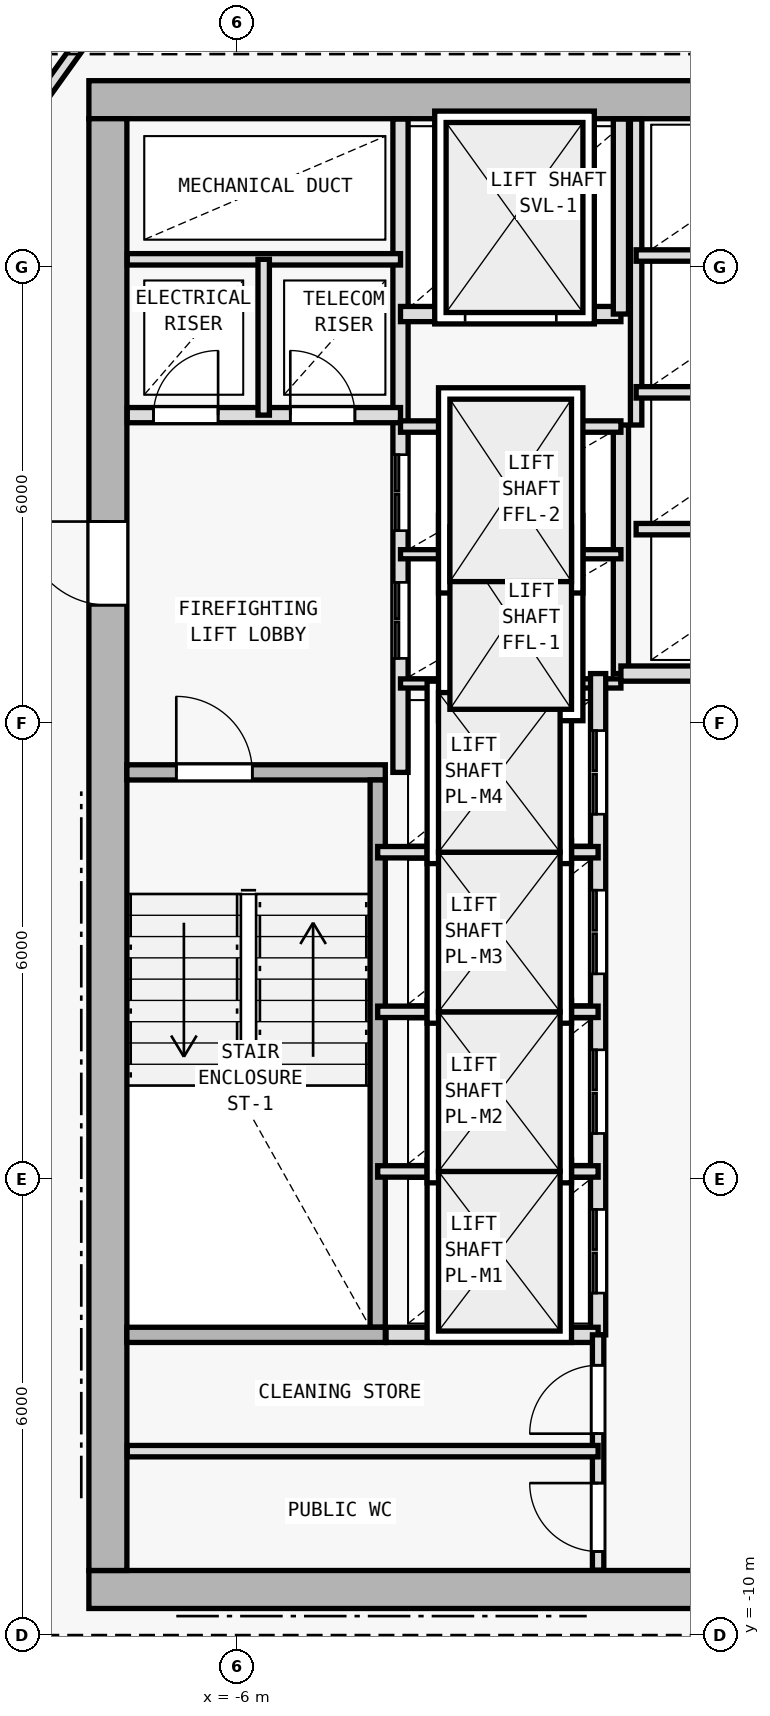
"""IFC4 building model, lengths in metres.
Left out: names, types, materials, properties, quantities, classifications, styles, units other than length and angle.
Written with IfcOpenShell. Run it as: python <this file> out.ifc"""

import sys

from ifc_helpers import new_model, si_unit, direction, frame, frame_2d, origin, origin_2d, place, context, subcontext, project, spatial, rectangle, i_section, extrude, element, fill, save


model = new_model("IFC4")
c1 = context("Model", 3, precision=1e-05, world=origin(), true_north=direction((0.0, 1.0)))
c2 = subcontext(c1, "Body", "Model", "MODEL_VIEW")
j1 = project(units=[si_unit("LENGTHUNIT", "METRE"), si_unit("PLANEANGLEUNIT", "RADIAN")], contexts=[c1])
p1 = place(None, origin())
s1 = spatial("IfcSite", under=j1, at=p1, CompositionType="ELEMENT")
p2 = place(p1, origin())
s2 = spatial("IfcBuilding", under=s1, at=p2, CompositionType="ELEMENT")
p3 = place(p2, frame((0.0, 0.0, 167.4)))
s3 = spatial("IfcBuildingStorey", under=s2, at=p3, CompositionType="ELEMENT", Elevation=167.4)
for number, where, z_axis, x_axis in (
    (1, (-7.7, -9.4, 0.0), (0.0, 0.0, 1.0), (1.0, 0.0, 0.0)),
    (2, (-7.7, 10.2, 0.0), (0.0, 0.0, 1.0), (1.0, 0.0, 0.0)),
    (3, (0.0, -9.4, 0.0), (0.0, 0.0, 1.0), (1.0, 0.0, 0.0)),
    (4, (-7.7, 2.0, 0.0), (0.0, 0.0, 1.0), (1.0, 0.0, 0.0)),
):
    element("IfcColumn", number, at=place(p3, frame(where, z_axis=z_axis, x_axis=x_axis)), inside=s3, PredefinedType="COLUMN", context=c2, shape_type="SweptSolid", body=[
        extrude(i_section(OverallWidth=0.404, OverallDepth=0.407, WebThickness=0.017, FlangeThickness=0.028, FilletRadius=0.015, at=origin_2d()), origin(), (0.0, 0.0, 1.0), 3.6),
    ])
p4 = place(p3, frame((-7.95, -9.4, 0.0), z_axis=(0.0, 0.0, 1.0), x_axis=(1.0, 0.0, 0.0)))
e5 = element("IfcWall", 5, at=p4, inside=s3, PredefinedType="SHEAR", context=c2, shape_type="SweptSolid", body=[
    extrude(rectangle(XDim=15.9, YDim=0.5, at=frame_2d((7.95, 0.0))), origin(), (0.0, 0.0, 1.0), 3.35),
])
p5 = place(p4, frame((9.6, 0.0, 0.0)))
e6 = element("IfcOpeningElement", 6, at=p5, cuts=e5, PredefinedType="OPENING", context=c2, shape_type="SweptSolid", body=[
    extrude(rectangle(XDim=1.5, YDim=2.2, at=frame_2d((0.75, 1.1))), frame((0.0, 0.26, 0.0), z_axis=(0.0, -1.0, 0.0), x_axis=(1.0, 0.0, 0.0)), (0.0, 0.0, 1.0), 0.52),
])
p6 = place(p3, frame((7.95, 10.2, 0.0), z_axis=(0.0, 0.0, 1.0), x_axis=(-1.0, 0.0, 0.0)))
e7 = element("IfcWall", 7, at=p6, inside=s3, PredefinedType="SHEAR", context=c2, shape_type="SweptSolid", body=[
    extrude(rectangle(XDim=15.9, YDim=0.5, at=frame_2d((7.95, 0.0))), origin(), (0.0, 0.0, 1.0), 3.35),
])
p7 = place(p6, frame((4.4, 0.0, 0.0)))
e8 = element("IfcOpeningElement", 8, at=p7, cuts=e7, PredefinedType="OPENING", context=c2, shape_type="SweptSolid", body=[
    extrude(rectangle(XDim=1.1, YDim=2.15, at=frame_2d((0.55, 1.075))), frame((0.0, 0.26, 0.0), z_axis=(0.0, -1.0, 0.0), x_axis=(1.0, 0.0, 0.0)), (0.0, 0.0, 1.0), 0.52),
])
p8 = place(p3, frame((-7.7, -9.15, 0.0), z_axis=(0.0, 0.0, 1.0), x_axis=(0.0, 1.0, 0.0)))
e9 = element("IfcWall", 9, at=p8, inside=s3, PredefinedType="SHEAR", context=c2, shape_type="SweptSolid", body=[
    extrude(rectangle(XDim=19.1, YDim=0.5, at=frame_2d((9.55, 0.0))), origin(), (0.0, 0.0, 1.0), 3.35),
])
p9 = place(p8, frame((12.7, 0.0, 0.0)))
e10 = element("IfcOpeningElement", 10, at=p9, cuts=e9, PredefinedType="OPENING", context=c2, shape_type="SweptSolid", body=[
    extrude(rectangle(XDim=1.1, YDim=2.15, at=frame_2d((0.55, 1.075))), frame((0.0, 0.26, 0.0), z_axis=(0.0, -1.0, 0.0), x_axis=(1.0, 0.0, 0.0)), (0.0, 0.0, 1.0), 0.52),
])
p10 = place(p3, frame((-7.45, 1.35, 0.0), z_axis=(0.0, 0.0, 1.0), x_axis=(1.0, 0.0, 0.0)))
e11 = element("IfcWall", 11, at=p10, inside=s3, PredefinedType="SOLIDWALL", context=c2, shape_type="SweptSolid", body=[
    extrude(rectangle(XDim=3.4, YDim=0.2, at=frame_2d((1.7, 0.0))), origin(), (0.0, 0.0, 1.0), 3.35),
])
p11 = place(p10, frame((0.65, 0.0, 0.0)))
e12 = element("IfcOpeningElement", 12, at=p11, cuts=e11, PredefinedType="OPENING", context=c2, shape_type="SweptSolid", body=[
    extrude(rectangle(XDim=1.0, YDim=2.15, at=frame_2d((0.5, 1.075))), frame((0.0, 0.11, 0.0), z_axis=(0.0, -1.0, 0.0), x_axis=(1.0, 0.0, 0.0)), (0.0, 0.0, 1.0), 0.22),
])
p12 = place(p3, frame((-4.15, -5.95, 0.0), z_axis=(0.0, 0.0, 1.0), x_axis=(0.0, 1.0, 0.0)))
e13 = element("IfcWall", 13, at=p12, inside=s3, PredefinedType="SOLIDWALL", context=c2, shape_type="SweptSolid", body=[
    extrude(rectangle(XDim=7.2, YDim=0.2, at=frame_2d((3.6, 0.0))), origin(), (0.0, 0.0, 1.0), 3.35),
])
p13 = place(p3, frame((-3.85, 1.35, 0.0), z_axis=(0.0, 0.0, 1.0), x_axis=(0.0, 1.0, 0.0)))
e14 = element("IfcWall", 14, at=p13, inside=s3, PredefinedType="SOLIDWALL", context=c2, shape_type="SweptSolid", body=[
    extrude(rectangle(XDim=8.595, YDim=0.2, at=frame_2d((4.297, 0.0))), origin(), (0.0, 0.0, 1.0), 3.35),
])
p14 = place(p13, frame((1.5, 0.0, 0.0)))
e15 = element("IfcOpeningElement", 15, at=p14, cuts=e14, PredefinedType="OPENING", context=c2, shape_type="SweptSolid", body=[
    extrude(rectangle(XDim=1.0, YDim=2.15, at=frame_2d((0.5, 1.075))), frame((0.0, 0.11, 0.0), z_axis=(0.0, -1.0, 0.0), x_axis=(1.0, 0.0, 0.0)), (0.0, 0.0, 1.0), 0.22),
])
p15 = place(p13, frame((3.18, 0.0, 0.0)))
e16 = element("IfcOpeningElement", 16, at=p15, cuts=e14, PredefinedType="OPENING", context=c2, shape_type="SweptSolid", body=[
    extrude(rectangle(XDim=1.0, YDim=2.15, at=frame_2d((0.5, 1.075))), frame((0.0, 0.11, 0.0), z_axis=(0.0, -1.0, 0.0), x_axis=(1.0, 0.0, 0.0)), (0.0, 0.0, 1.0), 0.22),
])
p16 = place(p3, frame((-7.445, 6.05, 0.0), z_axis=(0.0, 0.0, 1.0), x_axis=(1.0, 0.0, 0.0)))
e17 = element("IfcWall", 17, at=p16, inside=s3, PredefinedType="SOLIDWALL", context=c2, shape_type="SweptSolid", body=[
    extrude(rectangle(XDim=3.595, YDim=0.2, at=frame_2d((1.797, 0.0))), origin(), (0.0, 0.0, 1.0), 3.35),
])
p17 = place(p16, frame((0.345, 0.0, 0.0)))
e18 = element("IfcOpeningElement", 18, at=p17, cuts=e17, PredefinedType="OPENING", context=c2, shape_type="SweptSolid", body=[
    extrude(rectangle(XDim=0.85, YDim=2.1, at=frame_2d((0.425, 1.05))), frame((0.0, 0.11, 0.0), z_axis=(0.0, -1.0, 0.0), x_axis=(1.0, 0.0, 0.0)), (0.0, 0.0, 1.0), 0.22),
])
p18 = place(p16, frame((2.145, 0.0, 0.0)))
e19 = element("IfcOpeningElement", 19, at=p18, cuts=e17, PredefinedType="OPENING", context=c2, shape_type="SweptSolid", body=[
    extrude(rectangle(XDim=0.85, YDim=2.1, at=frame_2d((0.425, 1.05))), frame((0.0, 0.11, 0.0), z_axis=(0.0, -1.0, 0.0), x_axis=(1.0, 0.0, 0.0)), (0.0, 0.0, 1.0), 0.22),
])
p19 = place(p3, frame((-7.445, 8.1, 0.0), z_axis=(0.0, 0.0, 1.0), x_axis=(1.0, 0.0, 0.0)))
e20 = element("IfcWall", 20, at=p19, inside=s3, PredefinedType="PARTITIONING", context=c2, shape_type="SweptSolid", body=[
    extrude(rectangle(XDim=3.595, YDim=0.15, at=frame_2d((1.797, 0.0))), origin(), (0.0, 0.0, 1.0), 3.35),
])
p20 = place(p3, frame((-5.65, 6.05, 0.0), z_axis=(0.0, 0.0, 1.0), x_axis=(0.0, 1.0, 0.0)))
e21 = element("IfcWall", 21, at=p20, inside=s3, PredefinedType="PARTITIONING", context=c2, shape_type="SweptSolid", body=[
    extrude(rectangle(XDim=2.05, YDim=0.15, at=frame_2d((1.025, 0.0))), origin(), (0.0, 0.0, 1.0), 3.35),
])
p21 = place(p3, frame((-0.95, 2.65, 0.0), z_axis=(0.0, 0.0, 1.0), x_axis=(0.0, 1.0, 0.0)))
e22 = element("IfcWall", 22, at=p21, inside=s3, PredefinedType="SOLIDWALL", context=c2, shape_type="SweptSolid", body=[
    extrude(rectangle(XDim=3.27, YDim=0.2, at=frame_2d((1.635, 0.0))), origin(), (0.0, 0.0, 1.0), 3.35),
])
for number, where, z_axis, x_axis in (
    (23, (-3.85, 2.52, 0.0), (0.0, 0.0, 1.0), (1.0, 0.0, 0.0)),
    (24, (-3.85, 4.22, 0.0), (0.0, 0.0, 1.0), (1.0, 0.0, 0.0)),
):
    element("IfcWall", number, at=place(p3, frame(where, z_axis=z_axis, x_axis=x_axis)), inside=s3, PredefinedType="PARTITIONING", context=c2, shape_type="SweptSolid", body=[
        extrude(rectangle(XDim=2.9, YDim=0.12, at=frame_2d((1.45, 0.0))), origin(), (0.0, 0.0, 1.0), 3.35),
    ])
p22 = place(p3, frame((-3.85, 5.9, 0.0), z_axis=(0.0, 0.0, 1.0), x_axis=(1.0, 0.0, 0.0)))
e25 = element("IfcWall", 25, at=p22, inside=s3, PredefinedType="PARTITIONING", context=c2, shape_type="SweptSolid", body=[
    extrude(rectangle(XDim=2.9, YDim=0.15, at=frame_2d((1.45, 0.0))), origin(), (0.0, 0.0, 1.0), 3.35),
])
p23 = place(p3, frame((-3.85, 7.38, 0.0), z_axis=(0.0, 0.0, 1.0), x_axis=(1.0, 0.0, 0.0)))
e26 = element("IfcWall", 26, at=p23, inside=s3, PredefinedType="SOLIDWALL", context=c2, shape_type="SweptSolid", body=[
    extrude(rectangle(XDim=2.9, YDim=0.2, at=frame_2d((1.45, 0.0))), origin(), (0.0, 0.0, 1.0), 3.35),
])
p24 = place(p23, frame((0.85, 0.0, 0.0)))
e27 = element("IfcOpeningElement", 27, at=p24, cuts=e26, PredefinedType="OPENING", context=c2, shape_type="SweptSolid", body=[
    extrude(rectangle(XDim=1.2, YDim=2.2, at=frame_2d((0.6, 1.1))), frame((0.0, 0.11, 0.0), z_axis=(0.0, -1.0, 0.0), x_axis=(1.0, 0.0, 0.0)), (0.0, 0.0, 1.0), 0.22),
])
p25 = place(p3, frame((-0.95, 7.38, 0.0), z_axis=(0.0, 0.0, 1.0), x_axis=(0.0, 1.0, 0.0)))
e28 = element("IfcWall", 28, at=p25, inside=s3, PredefinedType="SOLIDWALL", context=c2, shape_type="SweptSolid", body=[
    extrude(rectangle(XDim=2.565, YDim=0.2, at=frame_2d((1.283, 0.0))), origin(), (0.0, 0.0, 1.0), 3.35),
])
p26 = place(p3, frame((-1.25, -6.05, 0.0), z_axis=(0.0, 0.0, 1.0), x_axis=(0.0, 1.0, 0.0)))
e29 = element("IfcWall", 29, at=p26, inside=s3, PredefinedType="SOLIDWALL", context=c2, shape_type="SweptSolid", body=[
    extrude(rectangle(XDim=8.7, YDim=0.2, at=frame_2d((4.35, 0.0))), origin(), (0.0, 0.0, 1.0), 3.35),
])
p27 = place(p26, frame((0.55, 0.0, 0.0)))
e30 = element("IfcOpeningElement", 30, at=p27, cuts=e29, PredefinedType="OPENING", context=c2, shape_type="SweptSolid", body=[
    extrude(rectangle(XDim=1.1, YDim=2.15, at=frame_2d((0.55, 1.075))), frame((0.0, 0.11, 0.0), z_axis=(0.0, -1.0, 0.0), x_axis=(1.0, 0.0, 0.0)), (0.0, 0.0, 1.0), 0.22),
])
p28 = place(p26, frame((2.65, 0.0, 0.0)))
e31 = element("IfcOpeningElement", 31, at=p28, cuts=e29, PredefinedType="OPENING", context=c2, shape_type="SweptSolid", body=[
    extrude(rectangle(XDim=1.1, YDim=2.15, at=frame_2d((0.55, 1.075))), frame((0.0, 0.11, 0.0), z_axis=(0.0, -1.0, 0.0), x_axis=(1.0, 0.0, 0.0)), (0.0, 0.0, 1.0), 0.22),
])
p29 = place(p26, frame((4.75, 0.0, 0.0)))
e32 = element("IfcOpeningElement", 32, at=p29, cuts=e29, PredefinedType="OPENING", context=c2, shape_type="SweptSolid", body=[
    extrude(rectangle(XDim=1.1, YDim=2.15, at=frame_2d((0.55, 1.075))), frame((0.0, 0.11, 0.0), z_axis=(0.0, -1.0, 0.0), x_axis=(1.0, 0.0, 0.0)), (0.0, 0.0, 1.0), 0.22),
])
p30 = place(p26, frame((6.85, 0.0, 0.0)))
e33 = element("IfcOpeningElement", 33, at=p30, cuts=e29, PredefinedType="OPENING", context=c2, shape_type="SweptSolid", body=[
    extrude(rectangle(XDim=1.1, YDim=2.15, at=frame_2d((0.55, 1.075))), frame((0.0, 0.11, 0.0), z_axis=(0.0, -1.0, 0.0), x_axis=(1.0, 0.0, 0.0)), (0.0, 0.0, 1.0), 0.22),
])
for number, where, z_axis, x_axis in (
    (34, (-4.15, -3.9, 0.0), (0.0, 0.0, 1.0), (1.0, 0.0, 0.0)),
    (35, (-4.15, -1.8, 0.0), (0.0, 0.0, 1.0), (1.0, 0.0, 0.0)),
    (36, (-4.15, 0.3, 0.0), (0.0, 0.0, 1.0), (1.0, 0.0, 0.0)),
):
    element("IfcWall", number, at=place(p3, frame(where, z_axis=z_axis, x_axis=x_axis)), inside=s3, PredefinedType="PARTITIONING", context=c2, shape_type="SweptSolid", body=[
        extrude(rectangle(XDim=2.9, YDim=0.15, at=frame_2d((1.45, 0.0))), origin(), (0.0, 0.0, 1.0), 3.35),
    ])
p31 = place(p3, frame((-0.95, 2.65, 0.0), z_axis=(0.0, 0.0, 1.0), x_axis=(1.0, 0.0, 0.0)))
e37 = element("IfcWall", 37, at=p31, inside=s3, PredefinedType="SOLIDWALL", context=c2, shape_type="SweptSolid", body=[
    extrude(rectangle(XDim=2.9, YDim=0.2, at=frame_2d((1.45, 0.0))), origin(), (0.0, 0.0, 1.0), 3.35),
])
p32 = place(p3, frame((-0.75, 5.92, 0.0), z_axis=(0.0, 0.0, 1.0), x_axis=(0.0, 1.0, 0.0)))
e38 = element("IfcWall", 38, at=p32, inside=s3, PredefinedType="PARTITIONING", context=c2, shape_type="SweptSolid", body=[
    extrude(rectangle(XDim=4.025, YDim=0.15, at=frame_2d((2.013, 0.0))), origin(), (0.0, 0.0, 1.0), 3.35),
])
for number, where, z_axis, x_axis in (
    (39, (-0.75, 4.55, 0.0), (0.0, 0.0, 1.0), (1.0, 0.0, 0.0)),
    (40, (-0.75, 6.35, 0.0), (0.0, 0.0, 1.0), (1.0, 0.0, 0.0)),
    (41, (-0.75, 8.15, 0.0), (0.0, 0.0, 1.0), (1.0, 0.0, 0.0)),
):
    element("IfcWall", number, at=place(p3, frame(where, z_axis=z_axis, x_axis=x_axis)), inside=s3, PredefinedType="PARTITIONING", context=c2, shape_type="SweptSolid", body=[
        extrude(rectangle(XDim=2.7, YDim=0.15, at=frame_2d((1.35, 0.0))), origin(), (0.0, 0.0, 1.0), 3.35),
    ])
p33 = place(p3, frame((-7.45, -6.05, 0.0), z_axis=(0.0, 0.0, 1.0), x_axis=(1.0, 0.0, 0.0)))
e42 = element("IfcWall", 42, at=p33, inside=s3, PredefinedType="SOLIDWALL", context=c2, shape_type="SweptSolid", body=[
    extrude(rectangle(XDim=3.4, YDim=0.2, at=frame_2d((1.7, 0.0))), origin(), (0.0, 0.0, 1.0), 3.35),
])
p34 = place(p3, frame((-4.04, -6.05, 0.0), z_axis=(0.0, 0.0, 1.0), x_axis=(1.0, 0.0, 0.0)))
e43 = element("IfcWall", 43, at=p34, inside=s3, PredefinedType="SOLIDWALL", context=c2, shape_type="SweptSolid", body=[
    extrude(rectangle(XDim=2.79, YDim=0.2, at=frame_2d((1.395, 0.0))), origin(), (0.0, 0.0, 1.0), 3.35),
])
p35 = place(p3, frame((-1.25, -9.145, 0.0), z_axis=(0.0, 0.0, 1.0), x_axis=(0.0, 1.0, 0.0)))
e44 = element("IfcWall", 44, at=p35, inside=s3, PredefinedType="PARTITIONING", context=c2, shape_type="SweptSolid", body=[
    extrude(rectangle(XDim=3.095, YDim=0.15, at=frame_2d((1.547, 0.0))), origin(), (0.0, 0.0, 1.0), 3.35),
])
p36 = place(p35, frame((1.795, 0.0, 0.0)))
e45 = element("IfcOpeningElement", 45, at=p36, cuts=e44, PredefinedType="OPENING", context=c2, shape_type="SweptSolid", body=[
    extrude(rectangle(XDim=0.9, YDim=2.1, at=frame_2d((0.45, 1.05))), frame((0.0, 0.085, 0.0), z_axis=(0.0, -1.0, 0.0), x_axis=(1.0, 0.0, 0.0)), (0.0, 0.0, 1.0), 0.17),
])
p37 = place(p35, frame((0.245, 0.0, 0.0)))
e46 = element("IfcOpeningElement", 46, at=p37, cuts=e44, PredefinedType="OPENING", context=c2, shape_type="SweptSolid", body=[
    extrude(rectangle(XDim=0.9, YDim=2.1, at=frame_2d((0.45, 1.05))), frame((0.0, 0.085, 0.0), z_axis=(0.0, -1.0, 0.0), x_axis=(1.0, 0.0, 0.0)), (0.0, 0.0, 1.0), 0.17),
])
p38 = place(p3, frame((-7.445, -7.58, 0.0), z_axis=(0.0, 0.0, 1.0), x_axis=(1.0, 0.0, 0.0)))
e47 = element("IfcWall", 47, at=p38, inside=s3, PredefinedType="PARTITIONING", context=c2, shape_type="SweptSolid", body=[
    extrude(rectangle(XDim=6.195, YDim=0.15, at=frame_2d((3.098, 0.0))), origin(), (0.0, 0.0, 1.0), 3.35),
])
p39 = place(p3, frame((-9.86, 8.426, 0.0), z_axis=(0.0, 0.0, 1.0), x_axis=(0.582449511476, 0.812866881218, 0.0)))
e48 = element("IfcWall", 48, at=p39, inside=s3, PredefinedType="PARTITIONING", context=c2, shape_type="SweptSolid", body=[
    extrude(rectangle(XDim=4.84, YDim=0.15, at=frame_2d((2.42, 0.0))), origin(), (0.0, 0.0, 1.0), 2.965),
])
p40 = place(p39, frame((3.055, 0.0, 0.0)))
e49 = element("IfcOpeningElement", 49, at=p40, cuts=e48, PredefinedType="OPENING", context=c2, shape_type="SweptSolid", body=[
    extrude(rectangle(XDim=0.9, YDim=2.1, at=frame_2d((0.45, 1.05))), frame((0.0, 0.085, 0.0), z_axis=(0.0, -1.0, 0.0), x_axis=(1.0, 0.0, 0.0)), (0.0, 0.0, 1.0), 0.17),
])
p41 = place(p9, origin())
e50 = element("IfcDoor", 50, at=p41, inside=s3, OperationType="SINGLE_SWING_RIGHT", PredefinedType="DOOR", context=c2, shape_type="SweptSolid", body=[
    extrude(rectangle(XDim=1.1, YDim=2.15, at=frame_2d((0.55, 1.075))), frame((0.0, 0.025, 0.0), z_axis=(0.0, -1.0, 0.0), x_axis=(1.0, 0.0, 0.0)), (0.0, 0.0, 1.0), 0.05),
])
fill(e10, e50)
p42 = place(p11, origin())
e51 = element("IfcDoor", 51, at=p42, inside=s3, OperationType="SINGLE_SWING_LEFT", PredefinedType="DOOR", context=c2, shape_type="SweptSolid", body=[
    extrude(rectangle(XDim=1.0, YDim=2.15, at=frame_2d((0.5, 1.075))), frame((0.0, 0.025, 0.0), z_axis=(0.0, -1.0, 0.0), x_axis=(1.0, 0.0, 0.0)), (0.0, 0.0, 1.0), 0.05),
])
fill(e12, e51)
p43 = place(p17, origin())
e52 = element("IfcDoor", 52, at=p43, inside=s3, OperationType="SINGLE_SWING_RIGHT", PredefinedType="DOOR", context=c2, shape_type="SweptSolid", body=[
    extrude(rectangle(XDim=0.85, YDim=2.1, at=frame_2d((0.425, 1.05))), frame((0.0, 0.025, 0.0), z_axis=(0.0, -1.0, 0.0), x_axis=(1.0, 0.0, 0.0)), (0.0, 0.0, 1.0), 0.05),
])
fill(e18, e52)
p44 = place(p18, origin())
e53 = element("IfcDoor", 53, at=p44, inside=s3, OperationType="SINGLE_SWING_LEFT", PredefinedType="DOOR", context=c2, shape_type="SweptSolid", body=[
    extrude(rectangle(XDim=0.85, YDim=2.1, at=frame_2d((0.425, 1.05))), frame((0.0, 0.025, 0.0), z_axis=(0.0, -1.0, 0.0), x_axis=(1.0, 0.0, 0.0)), (0.0, 0.0, 1.0), 0.05),
])
fill(e19, e53)
p45 = place(p24, origin())
e54 = element("IfcDoor", 54, at=p45, inside=s3, OperationType="DOUBLE_DOOR_SLIDING", PredefinedType="DOOR", context=c2, shape_type="SweptSolid", body=[
    extrude(rectangle(XDim=1.2, YDim=2.2, at=frame_2d((0.6, 1.1))), frame((0.0, 0.025, 0.0), z_axis=(0.0, -1.0, 0.0), x_axis=(1.0, 0.0, 0.0)), (0.0, 0.0, 1.0), 0.05),
])
fill(e27, e54)
p46 = place(p27, origin())
e55 = element("IfcDoor", 55, at=p46, inside=s3, OperationType="DOUBLE_DOOR_SLIDING", PredefinedType="DOOR", context=c2, shape_type="SweptSolid", body=[
    extrude(rectangle(XDim=1.1, YDim=2.15, at=frame_2d((0.55, 1.075))), frame((0.0, 0.025, 0.0), z_axis=(0.0, -1.0, 0.0), x_axis=(1.0, 0.0, 0.0)), (0.0, 0.0, 1.0), 0.05),
])
fill(e30, e55)
p47 = place(p28, origin())
e56 = element("IfcDoor", 56, at=p47, inside=s3, OperationType="DOUBLE_DOOR_SLIDING", PredefinedType="DOOR", context=c2, shape_type="SweptSolid", body=[
    extrude(rectangle(XDim=1.1, YDim=2.15, at=frame_2d((0.55, 1.075))), frame((0.0, 0.025, 0.0), z_axis=(0.0, -1.0, 0.0), x_axis=(1.0, 0.0, 0.0)), (0.0, 0.0, 1.0), 0.05),
])
fill(e31, e56)
p48 = place(p29, origin())
e57 = element("IfcDoor", 57, at=p48, inside=s3, OperationType="DOUBLE_DOOR_SLIDING", PredefinedType="DOOR", context=c2, shape_type="SweptSolid", body=[
    extrude(rectangle(XDim=1.1, YDim=2.15, at=frame_2d((0.55, 1.075))), frame((0.0, 0.025, 0.0), z_axis=(0.0, -1.0, 0.0), x_axis=(1.0, 0.0, 0.0)), (0.0, 0.0, 1.0), 0.05),
])
fill(e32, e57)
p49 = place(p30, origin())
e58 = element("IfcDoor", 58, at=p49, inside=s3, OperationType="DOUBLE_DOOR_SLIDING", PredefinedType="DOOR", context=c2, shape_type="SweptSolid", body=[
    extrude(rectangle(XDim=1.1, YDim=2.15, at=frame_2d((0.55, 1.075))), frame((0.0, 0.025, 0.0), z_axis=(0.0, -1.0, 0.0), x_axis=(1.0, 0.0, 0.0)), (0.0, 0.0, 1.0), 0.05),
])
fill(e33, e58)
p50 = place(p14, origin())
e59 = element("IfcDoor", 59, at=p50, inside=s3, OperationType="DOUBLE_DOOR_SLIDING", PredefinedType="DOOR", context=c2, shape_type="SweptSolid", body=[
    extrude(rectangle(XDim=1.0, YDim=2.15, at=frame_2d((0.5, 1.075))), frame((0.0, 0.025, 0.0), z_axis=(0.0, -1.0, 0.0), x_axis=(1.0, 0.0, 0.0)), (0.0, 0.0, 1.0), 0.05),
])
fill(e15, e59)
p51 = place(p15, origin())
e60 = element("IfcDoor", 60, at=p51, inside=s3, OperationType="DOUBLE_DOOR_SLIDING", PredefinedType="DOOR", context=c2, shape_type="SweptSolid", body=[
    extrude(rectangle(XDim=1.0, YDim=2.15, at=frame_2d((0.5, 1.075))), frame((0.0, 0.025, 0.0), z_axis=(0.0, -1.0, 0.0), x_axis=(1.0, 0.0, 0.0)), (0.0, 0.0, 1.0), 0.05),
])
fill(e16, e60)
p52 = place(p36, origin())
e61 = element("IfcDoor", 61, at=p52, inside=s3, OperationType="SINGLE_SWING_LEFT", PredefinedType="DOOR", context=c2, shape_type="SweptSolid", body=[
    extrude(rectangle(XDim=0.9, YDim=2.1, at=frame_2d((0.45, 1.05))), frame((0.0, 0.025, 0.0), z_axis=(0.0, -1.0, 0.0), x_axis=(1.0, 0.0, 0.0)), (0.0, 0.0, 1.0), 0.05),
])
fill(e45, e61)
p53 = place(p37, origin())
e62 = element("IfcDoor", 62, at=p53, inside=s3, OperationType="SINGLE_SWING_RIGHT", PredefinedType="DOOR", context=c2, shape_type="SweptSolid", body=[
    extrude(rectangle(XDim=0.9, YDim=2.1, at=frame_2d((0.45, 1.05))), frame((0.0, 0.025, 0.0), z_axis=(0.0, -1.0, 0.0), x_axis=(1.0, 0.0, 0.0)), (0.0, 0.0, 1.0), 0.05),
])
fill(e46, e62)
save(model, sys.argv[1])
